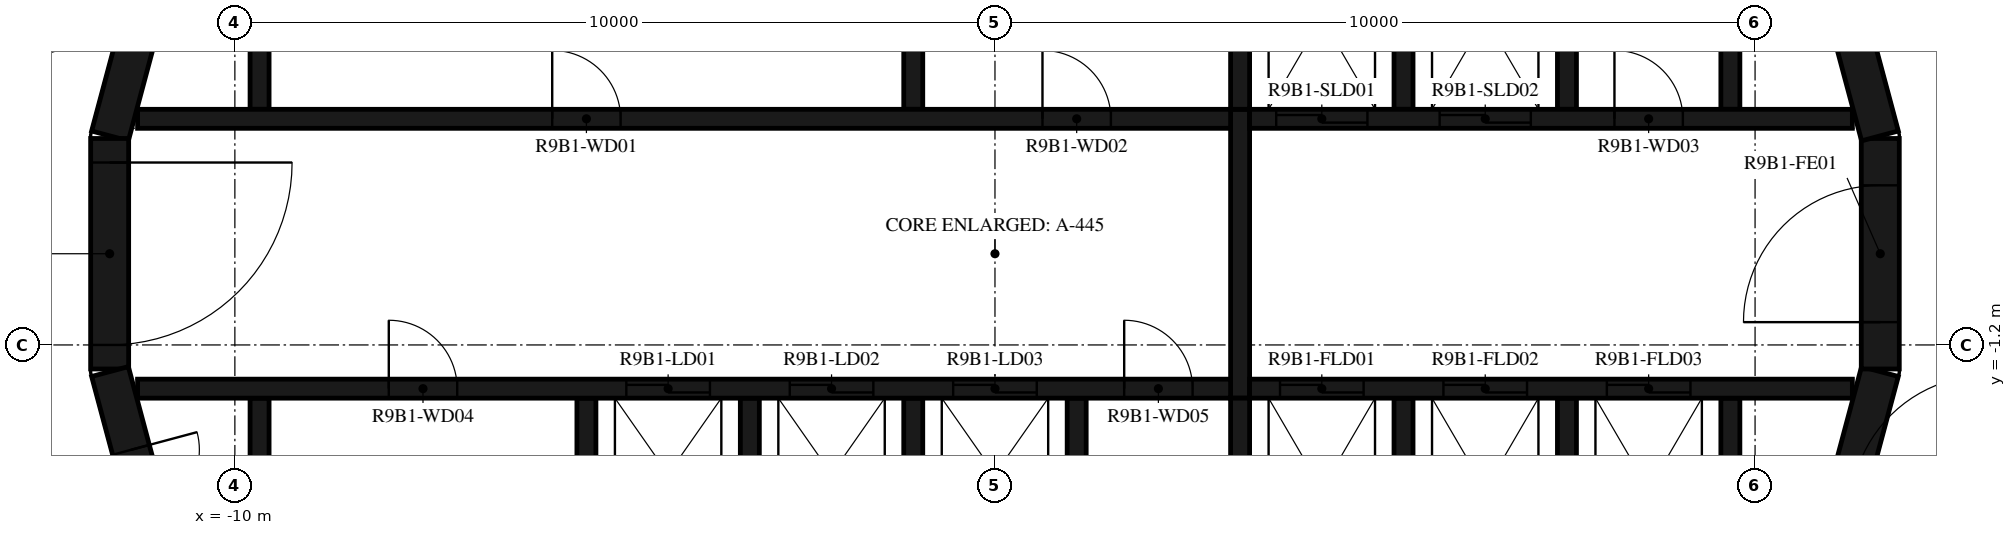
"""IFC4 building model, lengths in metres.
Left out: names, types, materials, properties, quantities, classifications, styles, units other than length and angle.
Written with IfcOpenShell. Run it as: python <this file> out.ifc"""

import sys

from ifc_helpers import new_model, si_unit, direction, frame, frame_2d, origin, place, context, subcontext, project, spatial, polyline, rectangle, outline, extrude, element, fill, save


model = new_model("IFC4")
c1 = context("Model", 3, precision=1e-05, world=origin(), true_north=direction((0.0, 1.0)))
c2 = subcontext(c1, "Body", "Model", "MODEL_VIEW")
j1 = project(units=[si_unit("LENGTHUNIT", "METRE"), si_unit("PLANEANGLEUNIT", "RADIAN")], contexts=[c1])
p1 = place(None, origin())
s1 = spatial("IfcSite", under=j1, at=p1, CompositionType="ELEMENT")
p2 = place(p1, origin())
s2 = spatial("IfcBuilding", under=s1, at=p2, CompositionType="ELEMENT")
p3 = place(p2, frame((0.0, 0.0, 350.5)))
s3 = spatial("IfcBuildingStorey", under=s2, at=p3, CompositionType="ELEMENT", Elevation=350.5)
p4 = place(p3, frame((10.858, -4.479, 0.0), z_axis=(0.0, 0.0, 1.0), x_axis=(0.258734743916, 0.965948410781, 0.0)))
e1 = element("IfcWall", 1, at=p4, inside=s3, PredefinedType="SHEAR", context=c2, shape_type="SweptSolid", body=[
    extrude(rectangle(XDim=3.033, YDim=0.5, at=frame_2d((1.516, 0.0))), origin(), (0.0, 0.0, 1.0), 3.12),
])
p5 = place(p3, frame((11.647, -1.516, 0.0), z_axis=(0.0, 0.0, 1.0), x_axis=(0.0, 1.0, 0.0)))
e2 = element("IfcWall", 2, at=p5, inside=s3, PredefinedType="SHEAR", context=c2, shape_type="SweptSolid", body=[
    extrude(rectangle(XDim=3.033, YDim=0.5, at=frame_2d((1.516, 0.0))), origin(), (0.0, 0.0, 1.0), 3.12),
])
p6 = place(p5, frame((0.616, 0.0, 0.0)))
e3 = element("IfcOpeningElement", 3, at=p6, cuts=e2, PredefinedType="OPENING", context=c2, shape_type="SweptSolid", body=[
    extrude(rectangle(XDim=1.8, YDim=2.1, at=frame_2d((0.9, 1.05))), frame((0.0, 0.26, 0.0), z_axis=(0.0, -1.0, 0.0), x_axis=(1.0, 0.0, 0.0)), (0.0, 0.0, 1.0), 0.52),
])
for number, where, z_axis, x_axis in (
    (4, (11.643, 1.55, 0.0), (0.0, 0.0, 1.0), (-0.259, 0.966, 0.0)),
    (5, (-10.858, 4.479, 0.0), (0.0, 0.0, 1.0), (-0.259, -0.966, 0.0)),
):
    element("IfcWall", number, at=place(p3, frame(where, z_axis=z_axis, x_axis=x_axis)), inside=s3, PredefinedType="SHEAR", context=c2, shape_type="SweptSolid", body=[
        extrude(rectangle(XDim=3.033, YDim=0.5, at=frame_2d((1.516, 0.0))), origin(), (0.0, 0.0, 1.0), 3.12),
    ])
p7 = place(p3, frame((-11.647, 1.516, 0.0), z_axis=(0.0, 0.0, 1.0), x_axis=(0.0, -1.0, 0.0)))
e6 = element("IfcWall", 6, at=p7, inside=s3, PredefinedType="SHEAR", context=c2, shape_type="SweptSolid", body=[
    extrude(rectangle(XDim=3.033, YDim=0.5, at=frame_2d((1.516, 0.0))), origin(), (0.0, 0.0, 1.0), 3.12),
])
p8 = place(p7, frame((0.316, 0.0, 0.0)))
e7 = element("IfcOpeningElement", 7, at=p8, cuts=e6, PredefinedType="OPENING", context=c2, shape_type="SweptSolid", body=[
    extrude(rectangle(XDim=2.4, YDim=2.1, at=frame_2d((1.2, 1.05))), frame((0.0, 0.26, 0.0), z_axis=(0.0, -1.0, 0.0), x_axis=(1.0, 0.0, 0.0)), (0.0, 0.0, 1.0), 0.52),
])
p9 = place(p3, frame((-11.643, -1.55, 0.0), z_axis=(0.0, 0.0, 1.0), x_axis=(0.258734743916, -0.965948410781, 0.0)))
e8 = element("IfcWall", 8, at=p9, inside=s3, PredefinedType="SHEAR", context=c2, shape_type="SweptSolid", body=[
    extrude(rectangle(XDim=3.033, YDim=0.5, at=frame_2d((1.516, 0.0))), origin(), (0.0, 0.0, 1.0), 3.12),
])
p10 = place(p9, frame((1.066, 0.0, 0.0)))
e9 = element("IfcOpeningElement", 9, at=p10, cuts=e8, PredefinedType="OPENING", context=c2, shape_type="SweptSolid", body=[
    extrude(rectangle(XDim=0.9, YDim=2.1, at=frame_2d((0.45, 1.05))), frame((0.0, 0.26, 0.0), z_axis=(0.0, -1.0, 0.0), x_axis=(1.0, 0.0, 0.0)), (0.0, 0.0, 1.0), 0.52),
])
p11 = place(p3, origin())
e10 = element("IfcWall", 10, at=p11, inside=s3, PredefinedType="SHEAR", context=c2, shape_type="SweptSolid", body=[
    extrude(outline(polyline([(-9.8, 1.9), (-9.55, 1.9), (-9.55, 4.8), (-1.2, 4.8), (-1.2, 1.9), (-0.95, 1.9), (-0.95, 4.8), (3.1, 4.8), (3.1, 1.9), (3.35, 1.9), (3.35, 4.8), (5.25, 4.8), (5.25, 1.9), (5.5, 1.9), (5.5, 4.8), (7.4, 4.8), (7.4, 1.9), (7.65, 1.9), (7.65, 4.8), (9.55, 4.8), (9.55, 1.9), (9.8, 1.9), (9.8, 4.8), (9.8, 5.05), (-9.8, 5.05), (-9.8, 4.8), (-9.8, 1.9)])), origin(), (0.0, 0.0, 1.0), 3.12),
])
p12 = place(p3, origin())
e11 = element("IfcWall", 11, at=p12, inside=s3, PredefinedType="SHEAR", context=c2, shape_type="SweptSolid", body=[
    extrude(outline(polyline([(9.8, -5.05), (9.8, -4.8), (9.8, -1.9), (9.55, -1.9), (9.55, -4.8), (7.65, -4.8), (7.65, -1.9), (7.4, -1.9), (7.4, -4.8), (5.5, -4.8), (5.5, -1.9), (5.25, -1.9), (5.25, -4.8), (3.35, -4.8), (3.35, -1.9), (3.1, -1.9), (3.1, -4.8), (1.2, -4.8), (1.2, -1.9), (0.95, -1.9), (0.95, -4.8), (-0.95, -4.8), (-0.95, -1.9), (-1.2, -1.9), (-1.2, -4.8), (-3.1, -4.8), (-3.1, -1.9), (-3.35, -1.9), (-3.35, -4.8), (-5.25, -4.8), (-5.25, -1.9), (-5.5, -1.9), (-5.5, -4.8), (-9.55, -4.8), (-9.55, -1.9), (-9.8, -1.9), (-9.8, -4.8), (-9.8, -5.05), (9.8, -5.05)])), origin(), (0.0, 0.0, 1.0), 3.12),
])
p13 = place(p3, frame((-11.28, 1.775, 0.0), z_axis=(0.0, 0.0, 1.0), x_axis=(1.0, 0.0, 0.0)))
e12 = element("IfcWall", 12, at=p13, inside=s3, PredefinedType="SHEAR", context=c2, shape_type="SweptSolid", body=[
    extrude(rectangle(XDim=14.38, YDim=0.25, at=frame_2d((7.19, 0.0))), origin(), (0.0, 0.0, 1.0), 3.12),
])
p14 = place(p13, frame((5.455, 0.0, 0.0)))
e13 = element("IfcOpeningElement", 13, at=p14, cuts=e12, PredefinedType="OPENING", context=c2, shape_type="SweptSolid", body=[
    extrude(rectangle(XDim=0.9, YDim=2.1, at=frame_2d((0.45, 1.05))), frame((0.0, 0.135, 0.0), z_axis=(0.0, -1.0, 0.0), x_axis=(1.0, 0.0, 0.0)), (0.0, 0.0, 1.0), 0.27),
])
p15 = place(p13, frame((11.905, 0.0, 0.0)))
e14 = element("IfcOpeningElement", 14, at=p15, cuts=e12, PredefinedType="OPENING", context=c2, shape_type="SweptSolid", body=[
    extrude(rectangle(XDim=0.9, YDim=2.1, at=frame_2d((0.45, 1.05))), frame((0.0, 0.135, 0.0), z_axis=(0.0, -1.0, 0.0), x_axis=(1.0, 0.0, 0.0)), (0.0, 0.0, 1.0), 0.27),
])
p16 = place(p3, frame((3.35, 1.775, 0.0), z_axis=(0.0, 0.0, 1.0), x_axis=(1.0, 0.0, 0.0)))
e15 = element("IfcWall", 15, at=p16, inside=s3, PredefinedType="SHEAR", context=c2, shape_type="SweptSolid", body=[
    extrude(rectangle(XDim=7.93, YDim=0.25, at=frame_2d((3.965, 0.0))), origin(), (0.0, 0.0, 1.0), 3.12),
])
p17 = place(p16, frame((0.35, 0.0, 0.0)))
e16 = element("IfcOpeningElement", 16, at=p17, cuts=e15, PredefinedType="OPENING", context=c2, shape_type="SweptSolid", body=[
    extrude(rectangle(XDim=1.2, YDim=2.4, at=frame_2d((0.6, 1.2))), frame((0.0, 0.135, 0.0), z_axis=(0.0, -1.0, 0.0), x_axis=(1.0, 0.0, 0.0)), (0.0, 0.0, 1.0), 0.27),
])
p18 = place(p16, frame((2.5, 0.0, 0.0)))
e17 = element("IfcOpeningElement", 17, at=p18, cuts=e15, PredefinedType="OPENING", context=c2, shape_type="SweptSolid", body=[
    extrude(rectangle(XDim=1.2, YDim=2.4, at=frame_2d((0.6, 1.2))), frame((0.0, 0.135, 0.0), z_axis=(0.0, -1.0, 0.0), x_axis=(1.0, 0.0, 0.0)), (0.0, 0.0, 1.0), 0.27),
])
p19 = place(p16, frame((4.8, 0.0, 0.0)))
e18 = element("IfcOpeningElement", 18, at=p19, cuts=e15, PredefinedType="OPENING", context=c2, shape_type="SweptSolid", body=[
    extrude(rectangle(XDim=0.9, YDim=2.1, at=frame_2d((0.45, 1.05))), frame((0.0, 0.135, 0.0), z_axis=(0.0, -1.0, 0.0), x_axis=(1.0, 0.0, 0.0)), (0.0, 0.0, 1.0), 0.27),
])
p20 = place(p3, frame((-11.28, -1.775, 0.0), z_axis=(0.0, 0.0, 1.0), x_axis=(1.0, 0.0, 0.0)))
e19 = element("IfcWall", 19, at=p20, inside=s3, PredefinedType="SHEAR", context=c2, shape_type="SweptSolid", body=[
    extrude(rectangle(XDim=14.38, YDim=0.25, at=frame_2d((7.19, 0.0))), origin(), (0.0, 0.0, 1.0), 3.12),
])
p21 = place(p20, frame((6.43, 0.0, 0.0)))
e20 = element("IfcOpeningElement", 20, at=p21, cuts=e19, PredefinedType="OPENING", context=c2, shape_type="SweptSolid", body=[
    extrude(rectangle(XDim=1.1, YDim=2.1, at=frame_2d((0.55, 1.05))), frame((0.0, 0.135, 0.0), z_axis=(0.0, -1.0, 0.0), x_axis=(1.0, 0.0, 0.0)), (0.0, 0.0, 1.0), 0.27),
])
p22 = place(p20, frame((8.58, 0.0, 0.0)))
e21 = element("IfcOpeningElement", 21, at=p22, cuts=e19, PredefinedType="OPENING", context=c2, shape_type="SweptSolid", body=[
    extrude(rectangle(XDim=1.1, YDim=2.1, at=frame_2d((0.55, 1.05))), frame((0.0, 0.135, 0.0), z_axis=(0.0, -1.0, 0.0), x_axis=(1.0, 0.0, 0.0)), (0.0, 0.0, 1.0), 0.27),
])
p23 = place(p20, frame((10.73, 0.0, 0.0)))
e22 = element("IfcOpeningElement", 22, at=p23, cuts=e19, PredefinedType="OPENING", context=c2, shape_type="SweptSolid", body=[
    extrude(rectangle(XDim=1.1, YDim=2.1, at=frame_2d((0.55, 1.05))), frame((0.0, 0.135, 0.0), z_axis=(0.0, -1.0, 0.0), x_axis=(1.0, 0.0, 0.0)), (0.0, 0.0, 1.0), 0.27),
])
p24 = place(p20, frame((3.305, 0.0, 0.0)))
e23 = element("IfcOpeningElement", 23, at=p24, cuts=e19, PredefinedType="OPENING", context=c2, shape_type="SweptSolid", body=[
    extrude(rectangle(XDim=0.9, YDim=2.1, at=frame_2d((0.45, 1.05))), frame((0.0, 0.135, 0.0), z_axis=(0.0, -1.0, 0.0), x_axis=(1.0, 0.0, 0.0)), (0.0, 0.0, 1.0), 0.27),
])
p25 = place(p20, frame((12.98, 0.0, 0.0)))
e24 = element("IfcOpeningElement", 24, at=p25, cuts=e19, PredefinedType="OPENING", context=c2, shape_type="SweptSolid", body=[
    extrude(rectangle(XDim=0.9, YDim=2.1, at=frame_2d((0.45, 1.05))), frame((0.0, 0.135, 0.0), z_axis=(0.0, -1.0, 0.0), x_axis=(1.0, 0.0, 0.0)), (0.0, 0.0, 1.0), 0.27),
])
p26 = place(p3, frame((3.35, -1.775, 0.0), z_axis=(0.0, 0.0, 1.0), x_axis=(1.0, 0.0, 0.0)))
e25 = element("IfcWall", 25, at=p26, inside=s3, PredefinedType="SHEAR", context=c2, shape_type="SweptSolid", body=[
    extrude(rectangle(XDim=7.93, YDim=0.25, at=frame_2d((3.965, 0.0))), origin(), (0.0, 0.0, 1.0), 3.12),
])
p27 = place(p26, frame((0.4, 0.0, 0.0)))
e26 = element("IfcOpeningElement", 26, at=p27, cuts=e25, PredefinedType="OPENING", context=c2, shape_type="SweptSolid", body=[
    extrude(rectangle(XDim=1.1, YDim=2.4, at=frame_2d((0.55, 1.2))), frame((0.0, 0.135, 0.0), z_axis=(0.0, -1.0, 0.0), x_axis=(1.0, 0.0, 0.0)), (0.0, 0.0, 1.0), 0.27),
])
p28 = place(p26, frame((2.55, 0.0, 0.0)))
e27 = element("IfcOpeningElement", 27, at=p28, cuts=e25, PredefinedType="OPENING", context=c2, shape_type="SweptSolid", body=[
    extrude(rectangle(XDim=1.1, YDim=2.4, at=frame_2d((0.55, 1.2))), frame((0.0, 0.135, 0.0), z_axis=(0.0, -1.0, 0.0), x_axis=(1.0, 0.0, 0.0)), (0.0, 0.0, 1.0), 0.27),
])
p29 = place(p26, frame((4.7, 0.0, 0.0)))
e28 = element("IfcOpeningElement", 28, at=p29, cuts=e25, PredefinedType="OPENING", context=c2, shape_type="SweptSolid", body=[
    extrude(rectangle(XDim=1.1, YDim=2.4, at=frame_2d((0.55, 1.2))), frame((0.0, 0.135, 0.0), z_axis=(0.0, -1.0, 0.0), x_axis=(1.0, 0.0, 0.0)), (0.0, 0.0, 1.0), 0.27),
])
p30 = place(p3, frame((3.225, -1.9, 0.0), z_axis=(0.0, 0.0, 1.0), x_axis=(0.0, 1.0, 0.0)))
e29 = element("IfcWall", 29, at=p30, inside=s3, PredefinedType="SHEAR", context=c2, shape_type="SweptSolid", body=[
    extrude(rectangle(XDim=3.8, YDim=0.25, at=frame_2d((1.9, 0.0))), origin(), (0.0, 0.0, 1.0), 3.12),
])
p31 = place(p3, frame((13.769, 1.691, 0.0), z_axis=(0.0, 0.0, 1.0), x_axis=(-0.374618189599, 0.92717916932, 0.0)))
e30 = element("IfcWall", 30, at=p31, inside=s3, PredefinedType="STANDARD", context=c2, shape_type="SweptSolid", body=[
    extrude(rectangle(XDim=7.181, YDim=0.2, at=frame_2d((3.591, 0.0))), origin(), (0.0, 0.0, 1.0), 3.12),
])
p32 = place(p31, frame((2.371, 0.0, 0.0)))
e31 = element("IfcOpeningElement", 31, at=p32, cuts=e30, PredefinedType="OPENING", context=c2, shape_type="SweptSolid", body=[
    extrude(rectangle(XDim=1.0, YDim=2.1, at=frame_2d((0.5, 1.05))), frame((0.0, 0.11, 0.0), z_axis=(0.0, -1.0, 0.0), x_axis=(1.0, 0.0, 0.0)), (0.0, 0.0, 1.0), 0.22),
])
p33 = place(p3, frame((-13.769, -1.691, 0.0), z_axis=(0.0, 0.0, 1.0), x_axis=(0.372720094028, -0.927943819155, 0.0)))
e32 = element("IfcWall", 32, at=p33, inside=s3, PredefinedType="STANDARD", context=c2, shape_type="SweptSolid", body=[
    extrude(rectangle(XDim=4.875, YDim=0.2, at=frame_2d((2.438, 0.0))), origin(), (0.0, 0.0, 1.0), 3.12),
])
p34 = place(p8, origin())
e33 = element("IfcDoor", 33, at=p34, inside=s3, OperationType="DOUBLE_DOOR_SINGLE_SWING", PredefinedType="DOOR", context=c2, shape_type="SweptSolid", body=[
    extrude(rectangle(XDim=2.4, YDim=2.1, at=frame_2d((1.2, 1.05))), frame((0.0, 0.025, 0.0), z_axis=(0.0, -1.0, 0.0), x_axis=(1.0, 0.0, 0.0)), (0.0, 0.0, 1.0), 0.05),
])
fill(e7, e33)
p35 = place(p6, origin())
e34 = element("IfcDoor", 34, at=p35, inside=s3, OperationType="DOUBLE_DOOR_SINGLE_SWING", PredefinedType="DOOR", context=c2, shape_type="SweptSolid", body=[
    extrude(rectangle(XDim=1.8, YDim=2.1, at=frame_2d((0.9, 1.05))), frame((0.0, 0.025, 0.0), z_axis=(0.0, -1.0, 0.0), x_axis=(1.0, 0.0, 0.0)), (0.0, 0.0, 1.0), 0.05),
])
fill(e3, e34)
p36 = place(p17, origin())
e35 = element("IfcDoor", 35, at=p36, inside=s3, OperationType="DOUBLE_DOOR_SLIDING", PredefinedType="DOOR", context=c2, shape_type="SweptSolid", body=[
    extrude(rectangle(XDim=1.2, YDim=2.4, at=frame_2d((0.6, 1.2))), frame((0.0, 0.025, 0.0), z_axis=(0.0, -1.0, 0.0), x_axis=(1.0, 0.0, 0.0)), (0.0, 0.0, 1.0), 0.05),
])
fill(e16, e35)
p37 = place(p18, origin())
e36 = element("IfcDoor", 36, at=p37, inside=s3, OperationType="DOUBLE_DOOR_SLIDING", PredefinedType="DOOR", context=c2, shape_type="SweptSolid", body=[
    extrude(rectangle(XDim=1.2, YDim=2.4, at=frame_2d((0.6, 1.2))), frame((0.0, 0.025, 0.0), z_axis=(0.0, -1.0, 0.0), x_axis=(1.0, 0.0, 0.0)), (0.0, 0.0, 1.0), 0.05),
])
fill(e17, e36)
p38 = place(p21, origin())
e37 = element("IfcDoor", 37, at=p38, inside=s3, OperationType="DOUBLE_DOOR_SLIDING", PredefinedType="DOOR", context=c2, shape_type="SweptSolid", body=[
    extrude(rectangle(XDim=1.1, YDim=2.1, at=frame_2d((0.55, 1.05))), frame((0.0, 0.025, 0.0), z_axis=(0.0, -1.0, 0.0), x_axis=(1.0, 0.0, 0.0)), (0.0, 0.0, 1.0), 0.05),
])
fill(e20, e37)
p39 = place(p22, origin())
e38 = element("IfcDoor", 38, at=p39, inside=s3, OperationType="DOUBLE_DOOR_SLIDING", PredefinedType="DOOR", context=c2, shape_type="SweptSolid", body=[
    extrude(rectangle(XDim=1.1, YDim=2.1, at=frame_2d((0.55, 1.05))), frame((0.0, 0.025, 0.0), z_axis=(0.0, -1.0, 0.0), x_axis=(1.0, 0.0, 0.0)), (0.0, 0.0, 1.0), 0.05),
])
fill(e21, e38)
p40 = place(p23, origin())
e39 = element("IfcDoor", 39, at=p40, inside=s3, OperationType="DOUBLE_DOOR_SLIDING", PredefinedType="DOOR", context=c2, shape_type="SweptSolid", body=[
    extrude(rectangle(XDim=1.1, YDim=2.1, at=frame_2d((0.55, 1.05))), frame((0.0, 0.025, 0.0), z_axis=(0.0, -1.0, 0.0), x_axis=(1.0, 0.0, 0.0)), (0.0, 0.0, 1.0), 0.05),
])
fill(e22, e39)
p41 = place(p27, origin())
e40 = element("IfcDoor", 40, at=p41, inside=s3, OperationType="DOUBLE_DOOR_SLIDING", PredefinedType="DOOR", context=c2, shape_type="SweptSolid", body=[
    extrude(rectangle(XDim=1.1, YDim=2.4, at=frame_2d((0.55, 1.2))), frame((0.0, 0.025, 0.0), z_axis=(0.0, -1.0, 0.0), x_axis=(1.0, 0.0, 0.0)), (0.0, 0.0, 1.0), 0.05),
])
fill(e26, e40)
p42 = place(p28, origin())
e41 = element("IfcDoor", 41, at=p42, inside=s3, OperationType="DOUBLE_DOOR_SLIDING", PredefinedType="DOOR", context=c2, shape_type="SweptSolid", body=[
    extrude(rectangle(XDim=1.1, YDim=2.4, at=frame_2d((0.55, 1.2))), frame((0.0, 0.025, 0.0), z_axis=(0.0, -1.0, 0.0), x_axis=(1.0, 0.0, 0.0)), (0.0, 0.0, 1.0), 0.05),
])
fill(e27, e41)
p43 = place(p29, origin())
e42 = element("IfcDoor", 42, at=p43, inside=s3, OperationType="DOUBLE_DOOR_SLIDING", PredefinedType="DOOR", context=c2, shape_type="SweptSolid", body=[
    extrude(rectangle(XDim=1.1, YDim=2.4, at=frame_2d((0.55, 1.2))), frame((0.0, 0.025, 0.0), z_axis=(0.0, -1.0, 0.0), x_axis=(1.0, 0.0, 0.0)), (0.0, 0.0, 1.0), 0.05),
])
fill(e28, e42)
p44 = place(p14, origin())
e43 = element("IfcDoor", 43, at=p44, inside=s3, OperationType="SINGLE_SWING_LEFT", PredefinedType="DOOR", context=c2, shape_type="SweptSolid", body=[
    extrude(rectangle(XDim=0.9, YDim=2.1, at=frame_2d((0.45, 1.05))), frame((0.0, 0.025, 0.0), z_axis=(0.0, -1.0, 0.0), x_axis=(1.0, 0.0, 0.0)), (0.0, 0.0, 1.0), 0.05),
])
fill(e13, e43)
p45 = place(p15, origin())
e44 = element("IfcDoor", 44, at=p45, inside=s3, OperationType="SINGLE_SWING_RIGHT", PredefinedType="DOOR", context=c2, shape_type="SweptSolid", body=[
    extrude(rectangle(XDim=0.9, YDim=2.1, at=frame_2d((0.45, 1.05))), frame((0.0, 0.025, 0.0), z_axis=(0.0, -1.0, 0.0), x_axis=(1.0, 0.0, 0.0)), (0.0, 0.0, 1.0), 0.05),
])
fill(e14, e44)
p46 = place(p19, origin())
e45 = element("IfcDoor", 45, at=p46, inside=s3, OperationType="SINGLE_SWING_LEFT", PredefinedType="DOOR", context=c2, shape_type="SweptSolid", body=[
    extrude(rectangle(XDim=0.9, YDim=2.1, at=frame_2d((0.45, 1.05))), frame((0.0, 0.025, 0.0), z_axis=(0.0, -1.0, 0.0), x_axis=(1.0, 0.0, 0.0)), (0.0, 0.0, 1.0), 0.05),
])
fill(e18, e45)
p47 = place(p24, origin())
e46 = element("IfcDoor", 46, at=p47, inside=s3, OperationType="SINGLE_SWING_RIGHT", PredefinedType="DOOR", context=c2, shape_type="SweptSolid", body=[
    extrude(rectangle(XDim=0.9, YDim=2.1, at=frame_2d((0.45, 1.05))), frame((0.0, 0.025, 0.0), z_axis=(0.0, -1.0, 0.0), x_axis=(1.0, 0.0, 0.0)), (0.0, 0.0, 1.0), 0.05),
])
fill(e23, e46)
p48 = place(p25, origin())
e47 = element("IfcDoor", 47, at=p48, inside=s3, OperationType="SINGLE_SWING_LEFT", PredefinedType="DOOR", context=c2, shape_type="SweptSolid", body=[
    extrude(rectangle(XDim=0.9, YDim=2.1, at=frame_2d((0.45, 1.05))), frame((0.0, 0.025, 0.0), z_axis=(0.0, -1.0, 0.0), x_axis=(1.0, 0.0, 0.0)), (0.0, 0.0, 1.0), 0.05),
])
fill(e24, e47)
p49 = place(p10, origin())
e48 = element("IfcDoor", 48, at=p49, inside=s3, OperationType="SINGLE_SWING_RIGHT", PredefinedType="DOOR", context=c2, shape_type="SweptSolid", body=[
    extrude(rectangle(XDim=0.9, YDim=2.1, at=frame_2d((0.45, 1.05))), frame((0.0, 0.025, 0.0), z_axis=(0.0, -1.0, 0.0), x_axis=(1.0, 0.0, 0.0)), (0.0, 0.0, 1.0), 0.05),
])
fill(e9, e48)
save(model, sys.argv[1])
